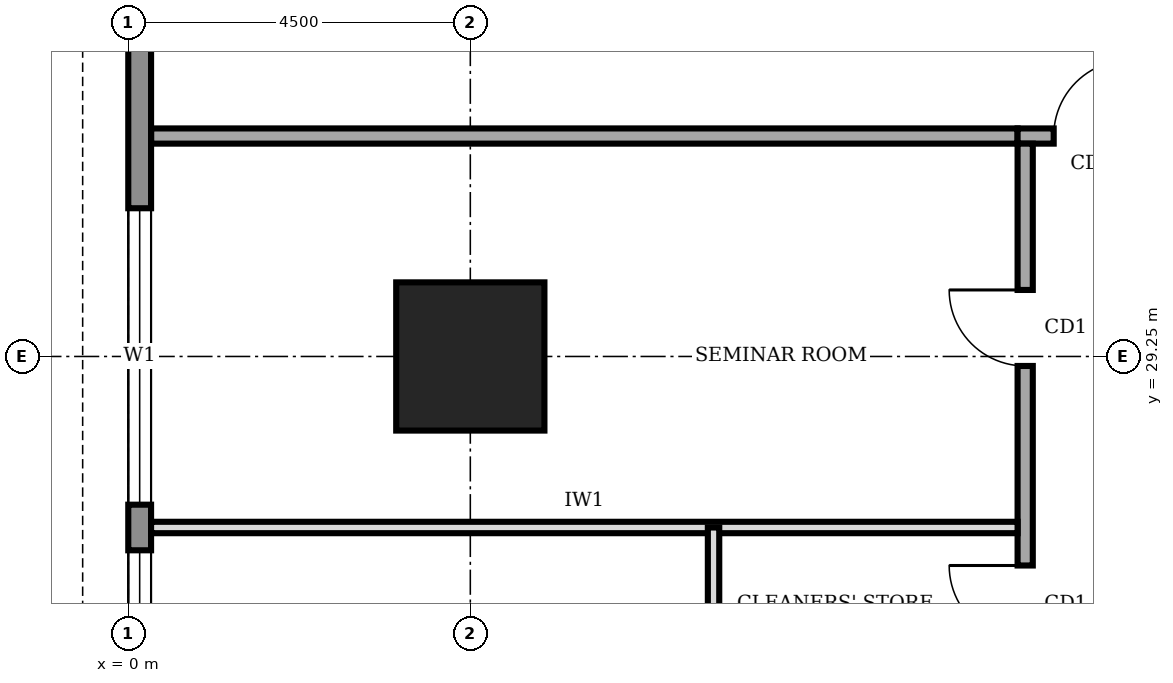
"""IFC4 building model, lengths in metres.
Left out: names, types, materials, properties, quantities, classifications, styles, units other than length and angle.
Written with IfcOpenShell. Run it as: python <this file> out.ifc"""

import sys

from ifc_helpers import new_model, si_unit, direction, frame, frame_2d, origin, origin_2d, place, context, subcontext, project, spatial, rectangle, extrude, element, fill, save


model = new_model("IFC4")
c1 = context("Model", 3, precision=1e-05, world=origin(), true_north=direction((0.0, 1.0)))
c2 = subcontext(c1, "Body", "Model", "MODEL_VIEW")
j1 = project(units=[si_unit("LENGTHUNIT", "METRE"), si_unit("PLANEANGLEUNIT", "RADIAN")], contexts=[c1])
p1 = place(None, origin())
s1 = spatial("IfcSite", under=j1, at=p1, CompositionType="ELEMENT")
p2 = place(p1, origin())
s2 = spatial("IfcBuilding", under=s1, at=p2, CompositionType="ELEMENT")
p3 = place(p2, frame((0.0, 0.0, 217.0)))
s3 = spatial("IfcBuildingStorey", under=s2, at=p3, CompositionType="ELEMENT", Elevation=217.0)
p4 = place(p3, frame((4.5, 29.25, 0.0), z_axis=(0.0, 0.0, 1.0), x_axis=(1.0, 0.0, 0.0)))
e1 = element("IfcColumn", 1, at=p4, inside=s3, PredefinedType="COLUMN", context=c2, shape_type="SweptSolid", body=[
    extrude(rectangle(XDim=1.95, YDim=1.95, at=origin_2d()), origin(), (0.0, 0.0, 1.0), 4.0),
])
p5 = place(p3, frame((0.15, 35.98, 0.0), z_axis=(0.0, 0.0, 1.0), x_axis=(0.0, -1.0, 0.0)))
e2 = element("IfcWall", 2, at=p5, inside=s3, PredefinedType="STANDARD", context=c2, shape_type="SweptSolid", body=[
    extrude(rectangle(XDim=31.46, YDim=0.3, at=frame_2d((15.73, 0.0))), origin(), (0.0, 0.0, 1.0), 3.75),
])
p6 = place(p5, frame((27.28, 0.0, 0.9)))
e3 = element("IfcOpeningElement", 3, at=p6, cuts=e2, PredefinedType="OPENING", context=c2, shape_type="SweptSolid", body=[
    extrude(rectangle(XDim=3.9, YDim=2.2, at=frame_2d((1.95, 1.1))), frame((0.0, 0.16, 0.0), z_axis=(0.0, -1.0, 0.0), x_axis=(1.0, 0.0, 0.0)), (0.0, 0.0, 1.0), 0.32),
])
p7 = place(p5, frame((22.78, 0.0, 0.9)))
e4 = element("IfcOpeningElement", 4, at=p7, cuts=e2, PredefinedType="OPENING", context=c2, shape_type="SweptSolid", body=[
    extrude(rectangle(XDim=3.9, YDim=2.2, at=frame_2d((1.95, 1.1))), frame((0.0, 0.16, 0.0), z_axis=(0.0, -1.0, 0.0), x_axis=(1.0, 0.0, 0.0)), (0.0, 0.0, 1.0), 0.32),
])
p8 = place(p5, frame((18.28, 0.0, 0.9)))
e5 = element("IfcOpeningElement", 5, at=p8, cuts=e2, PredefinedType="OPENING", context=c2, shape_type="SweptSolid", body=[
    extrude(rectangle(XDim=3.9, YDim=2.2, at=frame_2d((1.95, 1.1))), frame((0.0, 0.16, 0.0), z_axis=(0.0, -1.0, 0.0), x_axis=(1.0, 0.0, 0.0)), (0.0, 0.0, 1.0), 0.32),
])
p9 = place(p5, frame((13.78, 0.0, 0.9)))
e6 = element("IfcOpeningElement", 6, at=p9, cuts=e2, PredefinedType="OPENING", context=c2, shape_type="SweptSolid", body=[
    extrude(rectangle(XDim=3.9, YDim=2.2, at=frame_2d((1.95, 1.1))), frame((0.0, 0.16, 0.0), z_axis=(0.0, -1.0, 0.0), x_axis=(1.0, 0.0, 0.0)), (0.0, 0.0, 1.0), 0.32),
])
p10 = place(p5, frame((9.28, 0.0, 0.9)))
e7 = element("IfcOpeningElement", 7, at=p10, cuts=e2, PredefinedType="OPENING", context=c2, shape_type="SweptSolid", body=[
    extrude(rectangle(XDim=3.9, YDim=2.2, at=frame_2d((1.95, 1.1))), frame((0.0, 0.16, 0.0), z_axis=(0.0, -1.0, 0.0), x_axis=(1.0, 0.0, 0.0)), (0.0, 0.0, 1.0), 0.32),
])
p11 = place(p5, frame((4.78, 0.0, 0.9)))
e8 = element("IfcOpeningElement", 8, at=p11, cuts=e2, PredefinedType="OPENING", context=c2, shape_type="SweptSolid", body=[
    extrude(rectangle(XDim=3.9, YDim=2.2, at=frame_2d((1.95, 1.1))), frame((0.0, 0.16, 0.0), z_axis=(0.0, -1.0, 0.0), x_axis=(1.0, 0.0, 0.0)), (0.0, 0.0, 1.0), 0.32),
])
p12 = place(p3, frame((28.6, 32.15, 0.0), z_axis=(0.0, 0.0, 1.0), x_axis=(-1.0, 0.0, 0.0)))
e9 = element("IfcWall", 9, at=p12, inside=s3, PredefinedType="SOLIDWALL", context=c2, shape_type="SweptSolid", body=[
    extrude(rectangle(XDim=16.9, YDim=0.2, at=frame_2d((8.45, 0.0))), origin(), (0.0, 0.0, 1.0), 3.75),
])
p13 = place(p12, frame((15.425, 0.0, 0.0)))
e10 = element("IfcOpeningElement", 10, at=p13, cuts=e9, PredefinedType="OPENING", context=c2, shape_type="SweptSolid", body=[
    extrude(rectangle(XDim=1.0, YDim=2.1, at=frame_2d((0.5, 1.05))), frame((0.0, 0.11, 0.0), z_axis=(0.0, -1.0, 0.0), x_axis=(1.0, 0.0, 0.0)), (0.0, 0.0, 1.0), 0.22),
])
p14 = place(p12, frame((12.35, 0.0, 0.0)))
e11 = element("IfcOpeningElement", 11, at=p14, cuts=e9, PredefinedType="OPENING", context=c2, shape_type="SweptSolid", body=[
    extrude(rectangle(XDim=1.0, YDim=2.1, at=frame_2d((0.5, 1.05))), frame((0.0, 0.11, 0.0), z_axis=(0.0, -1.0, 0.0), x_axis=(1.0, 0.0, 0.0)), (0.0, 0.0, 1.0), 0.22),
])
p15 = place(p12, frame((5.6, 0.0, 0.0)))
e12 = element("IfcOpeningElement", 12, at=p15, cuts=e9, PredefinedType="OPENING", context=c2, shape_type="SweptSolid", body=[
    extrude(rectangle(XDim=1.0, YDim=2.1, at=frame_2d((0.5, 1.05))), frame((0.0, 0.11, 0.0), z_axis=(0.0, -1.0, 0.0), x_axis=(1.0, 0.0, 0.0)), (0.0, 0.0, 1.0), 0.22),
])
p16 = place(p12, frame((0.275, 0.0, 0.0)))
e13 = element("IfcOpeningElement", 13, at=p16, cuts=e9, PredefinedType="OPENING", context=c2, shape_type="SweptSolid", body=[
    extrude(rectangle(XDim=1.0, YDim=2.1, at=frame_2d((0.5, 1.05))), frame((0.0, 0.11, 0.0), z_axis=(0.0, -1.0, 0.0), x_axis=(1.0, 0.0, 0.0)), (0.0, 0.0, 1.0), 0.22),
])
p17 = place(p3, frame((11.8, 32.05, 0.0), z_axis=(0.0, 0.0, 1.0), x_axis=(0.0, -1.0, 0.0)))
e14 = element("IfcWall", 14, at=p17, inside=s3, PredefinedType="SOLIDWALL", context=c2, shape_type="SweptSolid", body=[
    extrude(rectangle(XDim=23.8, YDim=0.2, at=frame_2d((11.9, 0.0))), origin(), (0.0, 0.0, 1.0), 3.75),
])
p18 = place(p17, frame((20.675, 0.0, 0.0)))
e15 = element("IfcOpeningElement", 15, at=p18, cuts=e14, PredefinedType="OPENING", context=c2, shape_type="SweptSolid", body=[
    extrude(rectangle(XDim=1.0, YDim=2.1, at=frame_2d((0.5, 1.05))), frame((0.0, 0.11, 0.0), z_axis=(0.0, -1.0, 0.0), x_axis=(1.0, 0.0, 0.0)), (0.0, 0.0, 1.0), 0.22),
])
p19 = place(p17, frame((16.4, 0.0, 0.0)))
e16 = element("IfcOpeningElement", 16, at=p19, cuts=e14, PredefinedType="OPENING", context=c2, shape_type="SweptSolid", body=[
    extrude(rectangle(XDim=0.9, YDim=2.1, at=frame_2d((0.45, 1.05))), frame((0.0, 0.11, 0.0), z_axis=(0.0, -1.0, 0.0), x_axis=(1.0, 0.0, 0.0)), (0.0, 0.0, 1.0), 0.22),
])
p20 = place(p17, frame((11.6, 0.0, 0.0)))
e17 = element("IfcOpeningElement", 17, at=p20, cuts=e14, PredefinedType="OPENING", context=c2, shape_type="SweptSolid", body=[
    extrude(rectangle(XDim=0.9, YDim=2.1, at=frame_2d((0.45, 1.05))), frame((0.0, 0.11, 0.0), z_axis=(0.0, -1.0, 0.0), x_axis=(1.0, 0.0, 0.0)), (0.0, 0.0, 1.0), 0.22),
])
p21 = place(p17, frame((8.55, 0.0, 0.0)))
e18 = element("IfcOpeningElement", 18, at=p21, cuts=e14, PredefinedType="OPENING", context=c2, shape_type="SweptSolid", body=[
    extrude(rectangle(XDim=0.9, YDim=2.1, at=frame_2d((0.45, 1.05))), frame((0.0, 0.11, 0.0), z_axis=(0.0, -1.0, 0.0), x_axis=(1.0, 0.0, 0.0)), (0.0, 0.0, 1.0), 0.22),
])
p22 = place(p17, frame((5.55, 0.0, 0.0)))
e19 = element("IfcOpeningElement", 19, at=p22, cuts=e14, PredefinedType="OPENING", context=c2, shape_type="SweptSolid", body=[
    extrude(rectangle(XDim=1.0, YDim=2.1, at=frame_2d((0.5, 1.05))), frame((0.0, 0.11, 0.0), z_axis=(0.0, -1.0, 0.0), x_axis=(1.0, 0.0, 0.0)), (0.0, 0.0, 1.0), 0.22),
])
p23 = place(p17, frame((13.65, 0.0, 0.0)))
e20 = element("IfcOpeningElement", 20, at=p23, cuts=e14, PredefinedType="OPENING", context=c2, shape_type="SweptSolid", body=[
    extrude(rectangle(XDim=1.0, YDim=2.1, at=frame_2d((0.5, 1.05))), frame((0.0, 0.11, 0.0), z_axis=(0.0, -1.0, 0.0), x_axis=(1.0, 0.0, 0.0)), (0.0, 0.0, 1.0), 0.22),
])
p24 = place(p17, frame((1.925, 0.0, 0.0)))
e21 = element("IfcOpeningElement", 21, at=p24, cuts=e14, PredefinedType="OPENING", context=c2, shape_type="SweptSolid", body=[
    extrude(rectangle(XDim=1.0, YDim=2.1, at=frame_2d((0.5, 1.05))), frame((0.0, 0.11, 0.0), z_axis=(0.0, -1.0, 0.0), x_axis=(1.0, 0.0, 0.0)), (0.0, 0.0, 1.0), 0.22),
])
p25 = place(p3, frame((0.3, 32.15, 0.0), z_axis=(0.0, 0.0, 1.0), x_axis=(1.0, 0.0, 0.0)))
e22 = element("IfcWall", 22, at=p25, inside=s3, PredefinedType="SOLIDWALL", context=c2, shape_type="SweptSolid", body=[
    extrude(rectangle(XDim=11.4, YDim=0.2, at=frame_2d((5.7, 0.0))), origin(), (0.0, 0.0, 1.0), 3.75),
])
p26 = place(p3, frame((0.3, 27.0, 0.0), z_axis=(0.0, 0.0, 1.0), x_axis=(1.0, 0.0, 0.0)))
e23 = element("IfcWall", 23, at=p26, inside=s3, PredefinedType="PARTITIONING", context=c2, shape_type="SweptSolid", body=[
    extrude(rectangle(XDim=11.4, YDim=0.15, at=frame_2d((5.7, 0.0))), origin(), (0.0, 0.0, 1.0), 3.75),
])
p27 = place(p3, frame((7.7, 25.0, 0.0), z_axis=(0.0, 0.0, 1.0), x_axis=(0.0, 1.0, 0.0)))
e24 = element("IfcWall", 24, at=p27, inside=s3, PredefinedType="PARTITIONING", context=c2, shape_type="SweptSolid", body=[
    extrude(rectangle(XDim=2.0, YDim=0.15, at=frame_2d((1.0, 0.0))), origin(), (0.0, 0.0, 1.0), 3.75),
])
p28 = place(p10, origin())
e25 = element("IfcWindow", 25, at=p28, inside=s3, PartitioningType="SINGLE_PANEL", PredefinedType="WINDOW", context=c2, shape_type="SweptSolid", body=[
    extrude(rectangle(XDim=3.9, YDim=2.2, at=frame_2d((1.95, 1.1))), frame((0.0, 0.03, 0.0), z_axis=(0.0, -1.0, 0.0), x_axis=(1.0, 0.0, 0.0)), (0.0, 0.0, 1.0), 0.06),
])
fill(e7, e25)
p29 = place(p11, origin())
e26 = element("IfcWindow", 26, at=p29, inside=s3, PartitioningType="SINGLE_PANEL", PredefinedType="WINDOW", context=c2, shape_type="SweptSolid", body=[
    extrude(rectangle(XDim=3.9, YDim=2.2, at=frame_2d((1.95, 1.1))), frame((0.0, 0.03, 0.0), z_axis=(0.0, -1.0, 0.0), x_axis=(1.0, 0.0, 0.0)), (0.0, 0.0, 1.0), 0.06),
])
fill(e8, e26)
p30 = place(p13, frame((1.0, 0.0, 0.0), z_axis=(0.0, 0.0, 1.0), x_axis=(-1.0, 0.0, 0.0)))
e27 = element("IfcDoor", 27, at=p30, inside=s3, OperationType="SINGLE_SWING_RIGHT", PredefinedType="DOOR", context=c2, shape_type="SweptSolid", body=[
    extrude(rectangle(XDim=1.0, YDim=2.1, at=frame_2d((0.5, 1.05))), frame((0.0, 0.025, 0.0), z_axis=(0.0, -1.0, 0.0), x_axis=(1.0, 0.0, 0.0)), (0.0, 0.0, 1.0), 0.05),
])
fill(e10, e27)
p31 = place(p22, frame((1.0, 0.0, 0.0), z_axis=(0.0, 0.0, 1.0), x_axis=(-1.0, 0.0, 0.0)))
e28 = element("IfcDoor", 28, at=p31, inside=s3, OperationType="SINGLE_SWING_RIGHT", PredefinedType="DOOR", context=c2, shape_type="SweptSolid", body=[
    extrude(rectangle(XDim=1.0, YDim=2.1, at=frame_2d((0.5, 1.05))), frame((0.0, 0.025, 0.0), z_axis=(0.0, -1.0, 0.0), x_axis=(1.0, 0.0, 0.0)), (0.0, 0.0, 1.0), 0.05),
])
fill(e19, e28)
p32 = place(p24, frame((1.0, 0.0, 0.0), z_axis=(0.0, 0.0, 1.0), x_axis=(-1.0, 0.0, 0.0)))
e29 = element("IfcDoor", 29, at=p32, inside=s3, OperationType="SINGLE_SWING_RIGHT", PredefinedType="DOOR", context=c2, shape_type="SweptSolid", body=[
    extrude(rectangle(XDim=1.0, YDim=2.1, at=frame_2d((0.5, 1.05))), frame((0.0, 0.025, 0.0), z_axis=(0.0, -1.0, 0.0), x_axis=(1.0, 0.0, 0.0)), (0.0, 0.0, 1.0), 0.05),
])
fill(e21, e29)
save(model, sys.argv[1])
